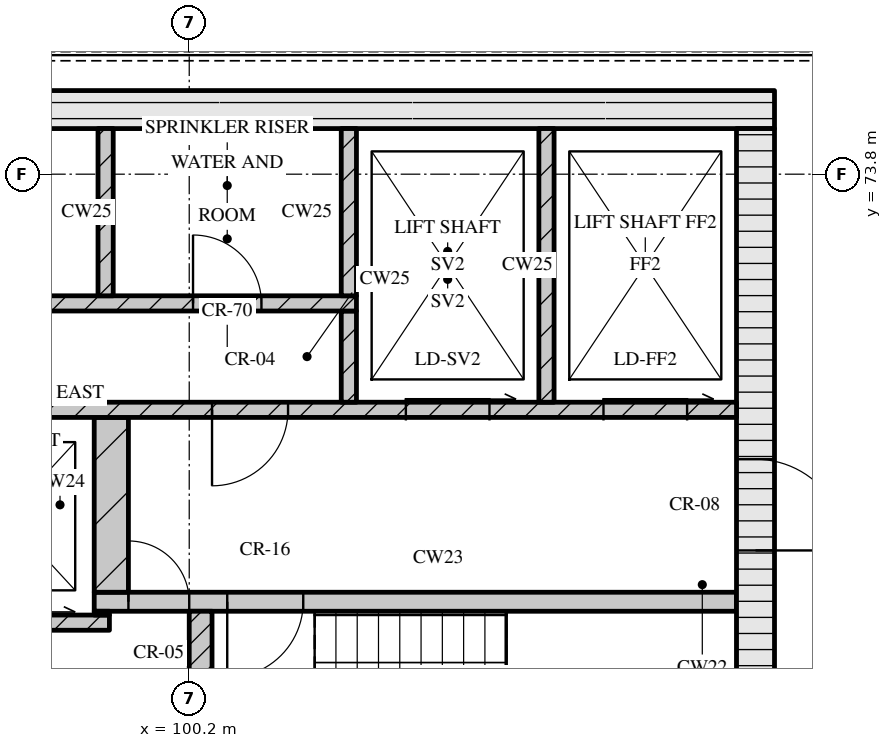
"""IFC4 building model, lengths in metres.
Left out: names, types, materials, properties, quantities, classifications, styles, units other than length and angle.
Written with IfcOpenShell. Run it as: python <this file> out.ifc"""

import sys

from ifc_helpers import new_model, si_unit, direction, frame, frame_2d, origin, place, context, subcontext, project, spatial, rectangle, extrude, element, fill, save


model = new_model("IFC4")
c1 = context("Model", 3, precision=1e-05, world=origin(), true_north=direction((0.0, 1.0)))
c2 = subcontext(c1, "Body", "Model", "MODEL_VIEW")
j1 = project(units=[si_unit("LENGTHUNIT", "METRE"), si_unit("PLANEANGLEUNIT", "RADIAN")], contexts=[c1])
p1 = place(None, origin())
s1 = spatial("IfcSite", under=j1, at=p1, CompositionType="ELEMENT")
p2 = place(p1, origin())
s2 = spatial("IfcBuilding", under=s1, at=p2, CompositionType="ELEMENT")
p3 = place(p2, frame((0.0, 0.0, 306.75)))
s3 = spatial("IfcBuildingStorey", under=s2, at=p3, CompositionType="ELEMENT", Elevation=306.75)
p4 = place(p3, frame((67.3, 74.65, 0.0), z_axis=(0.0, 0.0, 1.0), x_axis=(1.0, 0.0, 0.0)))
e1 = element("IfcWall", 1, at=p4, inside=s3, PredefinedType="SOLIDWALL", context=c2, shape_type="SweptSolid", body=[
    extrude(rectangle(XDim=40.6, YDim=0.5, at=frame_2d((20.3, 0.0))), origin(), (0.0, 0.0, 1.0), 3.3),
])
p5 = place(p3, frame((107.65, 62.4, 0.0), z_axis=(0.0, 0.0, 1.0), x_axis=(0.0, 1.0, 0.0)))
e2 = element("IfcWall", 2, at=p5, inside=s3, PredefinedType="SOLIDWALL", context=c2, shape_type="SweptSolid", body=[
    extrude(rectangle(XDim=12.0, YDim=0.5, at=frame_2d((6.0, 0.0))), origin(), (0.0, 0.0, 1.0), 3.3),
])
p6 = place(p5, frame((6.45, 0.0, 0.0)))
e3 = element("IfcOpeningElement", 3, at=p6, cuts=e2, PredefinedType="OPENING", context=c2, shape_type="SweptSolid", body=[
    extrude(rectangle(XDim=1.2, YDim=2.1, at=frame_2d((0.6, 1.05))), frame((0.0, 0.26, 0.0), z_axis=(0.0, -1.0, 0.0), x_axis=(1.0, 0.0, 0.0)), (0.0, 0.0, 1.0), 0.52),
])
p7 = place(p3, frame((100.35, 65.2, 0.0), z_axis=(0.0, 0.0, 1.0), x_axis=(0.0, 1.0, 0.0)))
e4 = element("IfcWall", 4, at=p7, inside=s3, PredefinedType="SOLIDWALL", context=c2, shape_type="SweptSolid", body=[
    extrude(rectangle(XDim=2.85, YDim=0.3, at=frame_2d((1.425, 0.0))), origin(), (0.0, 0.0, 1.0), 3.3),
])
p8 = place(p3, frame((76.05, 67.9, 0.0), z_axis=(0.0, 0.0, 1.0), x_axis=(1.0, 0.0, 0.0)))
e5 = element("IfcWall", 5, at=p8, inside=s3, PredefinedType="SOLIDWALL", context=c2, shape_type="SweptSolid", body=[
    extrude(rectangle(XDim=23.1, YDim=0.2, at=frame_2d((11.55, 0.0))), origin(), (0.0, 0.0, 1.0), 3.3),
])
p9 = place(p8, frame((1.4, 0.0, 0.0)))
e6 = element("IfcOpeningElement", 6, at=p9, cuts=e5, PredefinedType="OPENING", context=c2, shape_type="SweptSolid", body=[
    extrude(rectangle(XDim=0.9, YDim=2.1, at=frame_2d((0.45, 1.05))), frame((0.0, 0.11, 0.0), z_axis=(0.0, -1.0, 0.0), x_axis=(1.0, 0.0, 0.0)), (0.0, 0.0, 1.0), 0.22),
])
p10 = place(p8, frame((5.11, 0.0, 0.0)))
e7 = element("IfcOpeningElement", 7, at=p10, cuts=e5, PredefinedType="OPENING", context=c2, shape_type="SweptSolid", body=[
    extrude(rectangle(XDim=0.9, YDim=2.1, at=frame_2d((0.45, 1.05))), frame((0.0, 0.11, 0.0), z_axis=(0.0, -1.0, 0.0), x_axis=(1.0, 0.0, 0.0)), (0.0, 0.0, 1.0), 0.22),
])
p11 = place(p8, frame((8.45, 0.0, 0.0)))
e8 = element("IfcOpeningElement", 8, at=p11, cuts=e5, PredefinedType="OPENING", context=c2, shape_type="SweptSolid", body=[
    extrude(rectangle(XDim=0.9, YDim=2.1, at=frame_2d((0.45, 1.05))), frame((0.0, 0.11, 0.0), z_axis=(0.0, -1.0, 0.0), x_axis=(1.0, 0.0, 0.0)), (0.0, 0.0, 1.0), 0.22),
])
p12 = place(p8, frame((10.91, 0.0, 0.0)))
e9 = element("IfcOpeningElement", 9, at=p12, cuts=e5, PredefinedType="OPENING", context=c2, shape_type="SweptSolid", body=[
    extrude(rectangle(XDim=0.9, YDim=2.1, at=frame_2d((0.45, 1.05))), frame((0.0, 0.11, 0.0), z_axis=(0.0, -1.0, 0.0), x_axis=(1.0, 0.0, 0.0)), (0.0, 0.0, 1.0), 0.22),
])
p13 = place(p8, frame((13.55, 0.0, 0.0)))
e10 = element("IfcOpeningElement", 10, at=p13, cuts=e5, PredefinedType="OPENING", context=c2, shape_type="SweptSolid", body=[
    extrude(rectangle(XDim=1.0, YDim=2.1, at=frame_2d((0.5, 1.05))), frame((0.0, 0.11, 0.0), z_axis=(0.0, -1.0, 0.0), x_axis=(1.0, 0.0, 0.0)), (0.0, 0.0, 1.0), 0.22),
])
p14 = place(p8, frame((16.2, 0.0, 0.0)))
e11 = element("IfcOpeningElement", 11, at=p14, cuts=e5, PredefinedType="OPENING", context=c2, shape_type="SweptSolid", body=[
    extrude(rectangle(XDim=1.1, YDim=2.1, at=frame_2d((0.55, 1.05))), frame((0.0, 0.11, 0.0), z_axis=(0.0, -1.0, 0.0), x_axis=(1.0, 0.0, 0.0)), (0.0, 0.0, 1.0), 0.22),
])
p15 = place(p8, frame((18.7, 0.0, 0.0)))
e12 = element("IfcOpeningElement", 12, at=p15, cuts=e5, PredefinedType="OPENING", context=c2, shape_type="SweptSolid", body=[
    extrude(rectangle(XDim=1.1, YDim=2.1, at=frame_2d((0.55, 1.05))), frame((0.0, 0.11, 0.0), z_axis=(0.0, -1.0, 0.0), x_axis=(1.0, 0.0, 0.0)), (0.0, 0.0, 1.0), 0.22),
])
p16 = place(p8, frame((21.2, 0.0, 0.0)))
e13 = element("IfcOpeningElement", 13, at=p16, cuts=e5, PredefinedType="OPENING", context=c2, shape_type="SweptSolid", body=[
    extrude(rectangle(XDim=1.1, YDim=2.1, at=frame_2d((0.55, 1.05))), frame((0.0, 0.11, 0.0), z_axis=(0.0, -1.0, 0.0), x_axis=(1.0, 0.0, 0.0)), (0.0, 0.0, 1.0), 0.22),
])
p17 = place(p3, frame((98.95, 68.025, 0.0), z_axis=(0.0, 0.0, 1.0), x_axis=(1.0, 0.0, 0.0)))
e14 = element("IfcWall", 14, at=p17, inside=s3, PredefinedType="SOLIDWALL", context=c2, shape_type="SweptSolid", body=[
    extrude(rectangle(XDim=0.2, YDim=0.05, at=frame_2d((0.1, 0.0))), origin(), (0.0, 0.0, 1.0), 3.3),
])
p18 = place(p3, frame((98.95, 68.175, 0.0), z_axis=(0.0, 0.0, 1.0), x_axis=(1.0, 0.0, 0.0)))
e15 = element("IfcWall", 15, at=p18, inside=s3, PredefinedType="SOLIDWALL", context=c2, shape_type="SweptSolid", body=[
    extrude(rectangle(XDim=8.45, YDim=0.25, at=frame_2d((4.225, 0.0))), origin(), (0.0, 0.0, 1.0), 3.3),
])
p19 = place(p18, frame((0.45, 0.0, 0.0)))
e16 = element("IfcOpeningElement", 16, at=p19, cuts=e15, PredefinedType="OPENING", context=c2, shape_type="SweptSolid", body=[
    extrude(rectangle(XDim=0.8, YDim=2.1, at=frame_2d((0.4, 1.05))), frame((0.0, 0.135, 0.0), z_axis=(0.0, -1.0, 0.0), x_axis=(1.0, 0.0, 0.0)), (0.0, 0.0, 1.0), 0.27),
])
p20 = place(p18, frame((1.75, 0.0, 0.0)))
e17 = element("IfcOpeningElement", 17, at=p20, cuts=e15, PredefinedType="OPENING", context=c2, shape_type="SweptSolid", body=[
    extrude(rectangle(XDim=1.0, YDim=2.1, at=frame_2d((0.5, 1.05))), frame((0.0, 0.135, 0.0), z_axis=(0.0, -1.0, 0.0), x_axis=(1.0, 0.0, 0.0)), (0.0, 0.0, 1.0), 0.27),
])
p21 = place(p3, frame((99.175, 68.3, 0.0), z_axis=(0.0, 0.0, 1.0), x_axis=(0.0, 1.0, 0.0)))
e18 = element("IfcWall", 18, at=p21, inside=s3, PredefinedType="SOLIDWALL", context=c2, shape_type="SweptSolid", body=[
    extrude(rectangle(XDim=2.3, YDim=0.45, at=frame_2d((1.15, 0.0))), origin(), (0.0, 0.0, 1.0), 3.3),
])
p22 = place(p3, frame((67.8, 70.7, 0.0), z_axis=(0.0, 0.0, 1.0), x_axis=(1.0, 0.0, 0.0)))
e19 = element("IfcWall", 19, at=p22, inside=s3, PredefinedType="SOLIDWALL", context=c2, shape_type="SweptSolid", body=[
    extrude(rectangle(XDim=39.6, YDim=0.2, at=frame_2d((19.8, 0.0))), origin(), (0.0, 0.0, 1.0), 3.3),
])
p23 = place(p22, frame((0.65, 0.0, 0.0)))
e20 = element("IfcOpeningElement", 20, at=p23, cuts=e19, PredefinedType="OPENING", context=c2, shape_type="SweptSolid", body=[
    extrude(rectangle(XDim=1.1, YDim=2.1, at=frame_2d((0.55, 1.05))), frame((0.0, 0.11, 0.0), z_axis=(0.0, -1.0, 0.0), x_axis=(1.0, 0.0, 0.0)), (0.0, 0.0, 1.0), 0.22),
])
p24 = place(p22, frame((3.25, 0.0, 0.0)))
e21 = element("IfcOpeningElement", 21, at=p24, cuts=e19, PredefinedType="OPENING", context=c2, shape_type="SweptSolid", body=[
    extrude(rectangle(XDim=1.1, YDim=2.1, at=frame_2d((0.55, 1.05))), frame((0.0, 0.11, 0.0), z_axis=(0.0, -1.0, 0.0), x_axis=(1.0, 0.0, 0.0)), (0.0, 0.0, 1.0), 0.22),
])
p25 = place(p22, frame((5.9, 0.0, 0.0)))
e22 = element("IfcOpeningElement", 22, at=p25, cuts=e19, PredefinedType="OPENING", context=c2, shape_type="SweptSolid", body=[
    extrude(rectangle(XDim=1.0, YDim=2.1, at=frame_2d((0.5, 1.05))), frame((0.0, 0.11, 0.0), z_axis=(0.0, -1.0, 0.0), x_axis=(1.0, 0.0, 0.0)), (0.0, 0.0, 1.0), 0.22),
])
p26 = place(p22, frame((21.7, 0.0, 0.0)))
e23 = element("IfcOpeningElement", 23, at=p26, cuts=e19, PredefinedType="OPENING", context=c2, shape_type="SweptSolid", body=[
    extrude(rectangle(XDim=1.0, YDim=2.1, at=frame_2d((0.5, 1.05))), frame((0.0, 0.11, 0.0), z_axis=(0.0, -1.0, 0.0), x_axis=(1.0, 0.0, 0.0)), (0.0, 0.0, 1.0), 0.22),
])
p27 = place(p22, frame((32.7, 0.0, 0.0)))
e24 = element("IfcOpeningElement", 24, at=p27, cuts=e19, PredefinedType="OPENING", context=c2, shape_type="SweptSolid", body=[
    extrude(rectangle(XDim=1.0, YDim=2.1, at=frame_2d((0.5, 1.05))), frame((0.0, 0.11, 0.0), z_axis=(0.0, -1.0, 0.0), x_axis=(1.0, 0.0, 0.0)), (0.0, 0.0, 1.0), 0.22),
])
p28 = place(p22, frame((35.25, 0.0, 0.0)))
e25 = element("IfcOpeningElement", 25, at=p28, cuts=e19, PredefinedType="OPENING", context=c2, shape_type="SweptSolid", body=[
    extrude(rectangle(XDim=1.1, YDim=2.1, at=frame_2d((0.55, 1.05))), frame((0.0, 0.11, 0.0), z_axis=(0.0, -1.0, 0.0), x_axis=(1.0, 0.0, 0.0)), (0.0, 0.0, 1.0), 0.22),
])
p29 = place(p22, frame((37.85, 0.0, 0.0)))
e26 = element("IfcOpeningElement", 26, at=p29, cuts=e19, PredefinedType="OPENING", context=c2, shape_type="SweptSolid", body=[
    extrude(rectangle(XDim=1.1, YDim=2.1, at=frame_2d((0.55, 1.05))), frame((0.0, 0.11, 0.0), z_axis=(0.0, -1.0, 0.0), x_axis=(1.0, 0.0, 0.0)), (0.0, 0.0, 1.0), 0.22),
])
p30 = place(p3, frame((102.3, 70.8, 0.0), z_axis=(0.0, 0.0, 1.0), x_axis=(0.0, 1.0, 0.0)))
e27 = element("IfcWall", 27, at=p30, inside=s3, PredefinedType="SOLIDWALL", context=c2, shape_type="SweptSolid", body=[
    extrude(rectangle(XDim=1.2, YDim=0.2, at=frame_2d((0.6, 0.0))), origin(), (0.0, 0.0, 1.0), 3.3),
])
p31 = place(p3, frame((104.9, 70.8, 0.0), z_axis=(0.0, 0.0, 1.0), x_axis=(0.0, 1.0, 0.0)))
e28 = element("IfcWall", 28, at=p31, inside=s3, PredefinedType="SOLIDWALL", context=c2, shape_type="SweptSolid", body=[
    extrude(rectangle(XDim=3.6, YDim=0.2, at=frame_2d((1.8, 0.0))), origin(), (0.0, 0.0, 1.0), 3.3),
])
p32 = place(p3, frame((93.28, 72.1, 0.0), z_axis=(0.0, 0.0, 1.0), x_axis=(1.0, 0.0, 0.0)))
e29 = element("IfcWall", 29, at=p32, inside=s3, PredefinedType="SOLIDWALL", context=c2, shape_type="SweptSolid", body=[
    extrude(rectangle(XDim=9.12, YDim=0.2, at=frame_2d((4.56, 0.0))), origin(), (0.0, 0.0, 1.0), 3.3),
])
p33 = place(p32, frame((0.87, 0.0, 0.0)))
e30 = element("IfcOpeningElement", 30, at=p33, cuts=e29, PredefinedType="OPENING", context=c2, shape_type="SweptSolid", body=[
    extrude(rectangle(XDim=0.9, YDim=2.1, at=frame_2d((0.45, 1.05))), frame((0.0, 0.11, 0.0), z_axis=(0.0, -1.0, 0.0), x_axis=(1.0, 0.0, 0.0)), (0.0, 0.0, 1.0), 0.22),
])
p34 = place(p32, frame((3.73, 0.0, 0.0)))
e31 = element("IfcOpeningElement", 31, at=p34, cuts=e29, PredefinedType="OPENING", context=c2, shape_type="SweptSolid", body=[
    extrude(rectangle(XDim=0.9, YDim=2.1, at=frame_2d((0.45, 1.05))), frame((0.0, 0.11, 0.0), z_axis=(0.0, -1.0, 0.0), x_axis=(1.0, 0.0, 0.0)), (0.0, 0.0, 1.0), 0.22),
])
p35 = place(p32, frame((6.97, 0.0, 0.0)))
e32 = element("IfcOpeningElement", 32, at=p35, cuts=e29, PredefinedType="OPENING", context=c2, shape_type="SweptSolid", body=[
    extrude(rectangle(XDim=0.9, YDim=2.1, at=frame_2d((0.45, 1.05))), frame((0.0, 0.11, 0.0), z_axis=(0.0, -1.0, 0.0), x_axis=(1.0, 0.0, 0.0)), (0.0, 0.0, 1.0), 0.22),
])
for number, where, z_axis, x_axis in (
    (33, (99.1, 72.2, 0.0), (0.0, 0.0, 1.0), (0.0, 1.0, 0.0)),
    (34, (102.3, 72.2, 0.0), (0.0, 0.0, 1.0), (0.0, 1.0, 0.0)),
):
    element("IfcWall", number, at=place(p3, frame(where, z_axis=z_axis, x_axis=x_axis)), inside=s3, PredefinedType="SOLIDWALL", context=c2, shape_type="SweptSolid", body=[
        extrude(rectangle(XDim=2.2, YDim=0.2, at=frame_2d((1.1, 0.0))), origin(), (0.0, 0.0, 1.0), 3.3),
    ])
p36 = place(p19, origin())
e35 = element("IfcDoor", 35, at=p36, inside=s3, OperationType="SINGLE_SWING_LEFT", PredefinedType="DOOR", context=c2, shape_type="SweptSolid", body=[
    extrude(rectangle(XDim=0.8, YDim=2.1, at=frame_2d((0.4, 1.05))), frame((0.0, 0.025, 0.0), z_axis=(0.0, -1.0, 0.0), x_axis=(1.0, 0.0, 0.0)), (0.0, 0.0, 1.0), 0.05),
])
fill(e16, e35)
p37 = place(p20, origin())
e36 = element("IfcDoor", 36, at=p37, inside=s3, OperationType="SINGLE_SWING_RIGHT", PredefinedType="DOOR", context=c2, shape_type="SweptSolid", body=[
    extrude(rectangle(XDim=1.0, YDim=2.1, at=frame_2d((0.5, 1.05))), frame((0.0, 0.025, 0.0), z_axis=(0.0, -1.0, 0.0), x_axis=(1.0, 0.0, 0.0)), (0.0, 0.0, 1.0), 0.05),
])
fill(e17, e36)
p38 = place(p6, origin())
e37 = element("IfcDoor", 37, at=p38, inside=s3, OperationType="SINGLE_SWING_RIGHT", PredefinedType="DOOR", context=c2, shape_type="SweptSolid", body=[
    extrude(rectangle(XDim=1.2, YDim=2.1, at=frame_2d((0.6, 1.05))), frame((0.0, 0.025, 0.0), z_axis=(0.0, -1.0, 0.0), x_axis=(1.0, 0.0, 0.0)), (0.0, 0.0, 1.0), 0.05),
])
fill(e3, e37)
p39 = place(p27, origin())
e38 = element("IfcDoor", 38, at=p39, inside=s3, OperationType="SINGLE_SWING_RIGHT", PredefinedType="DOOR", context=c2, shape_type="SweptSolid", body=[
    extrude(rectangle(XDim=1.0, YDim=2.1, at=frame_2d((0.5, 1.05))), frame((0.0, 0.025, 0.0), z_axis=(0.0, -1.0, 0.0), x_axis=(1.0, 0.0, 0.0)), (0.0, 0.0, 1.0), 0.05),
])
fill(e24, e38)
p40 = place(p28, origin())
e39 = element("IfcDoor", 39, at=p40, inside=s3, OperationType="SLIDING_TO_RIGHT", PredefinedType="DOOR", context=c2, shape_type="SweptSolid", body=[
    extrude(rectangle(XDim=1.1, YDim=2.1, at=frame_2d((0.55, 1.05))), frame((0.0, 0.025, 0.0), z_axis=(0.0, -1.0, 0.0), x_axis=(1.0, 0.0, 0.0)), (0.0, 0.0, 1.0), 0.05),
])
fill(e25, e39)
p41 = place(p29, origin())
e40 = element("IfcDoor", 40, at=p41, inside=s3, OperationType="SLIDING_TO_RIGHT", PredefinedType="DOOR", context=c2, shape_type="SweptSolid", body=[
    extrude(rectangle(XDim=1.1, YDim=2.1, at=frame_2d((0.55, 1.05))), frame((0.0, 0.025, 0.0), z_axis=(0.0, -1.0, 0.0), x_axis=(1.0, 0.0, 0.0)), (0.0, 0.0, 1.0), 0.05),
])
fill(e26, e40)
p42 = place(p35, origin())
e41 = element("IfcDoor", 41, at=p42, inside=s3, OperationType="SINGLE_SWING_LEFT", PredefinedType="DOOR", context=c2, shape_type="SweptSolid", body=[
    extrude(rectangle(XDim=0.9, YDim=2.1, at=frame_2d((0.45, 1.05))), frame((0.0, 0.025, 0.0), z_axis=(0.0, -1.0, 0.0), x_axis=(1.0, 0.0, 0.0)), (0.0, 0.0, 1.0), 0.05),
])
fill(e32, e41)
save(model, sys.argv[1])
